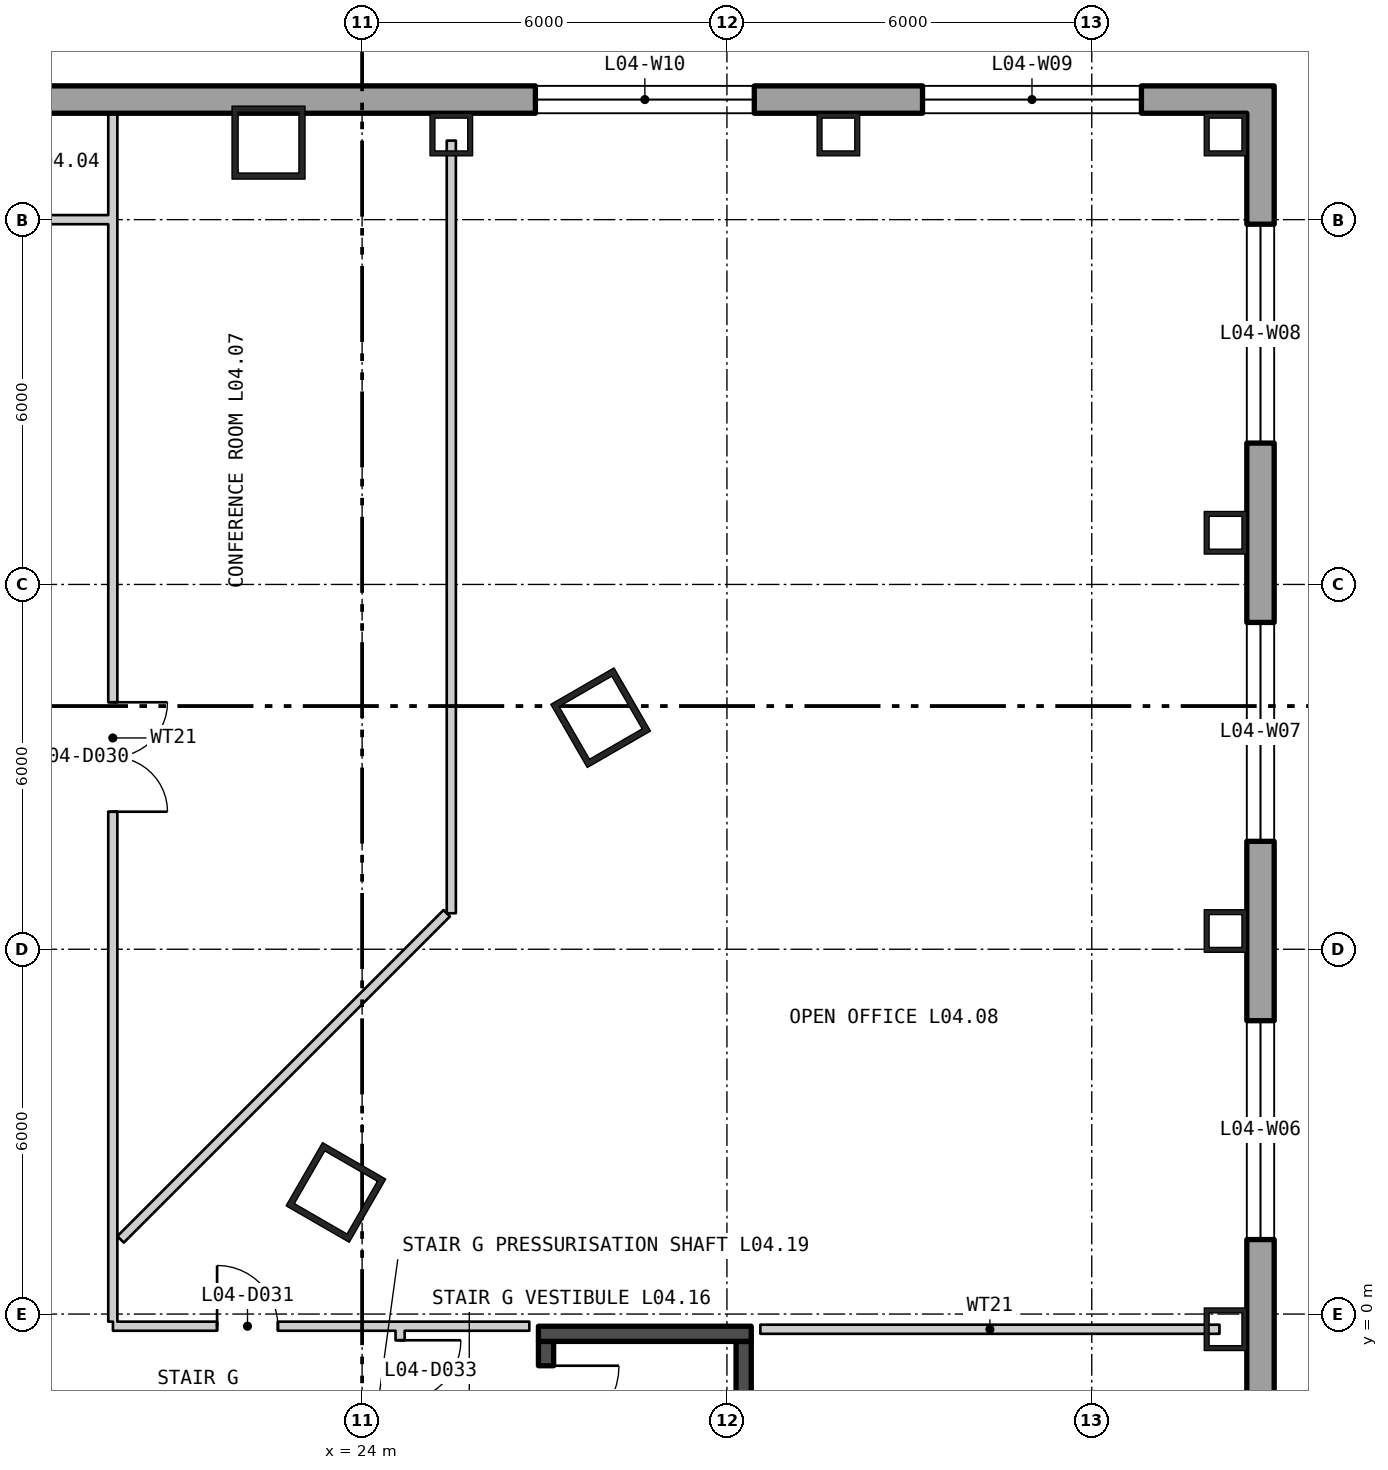
"""IFC4 building model, lengths in metres.
Left out: names, types, materials, properties, quantities, classifications, styles, units other than length and angle.
Written with IfcOpenShell. Run it as: python <this file> out.ifc"""

import sys

from ifc_helpers import new_model, si_unit, direction, frame, frame_2d, origin, origin_2d, place, context, subcontext, project, spatial, polyline, rectangle, hollow_rectangle, outline, extrude, element, fill, save


model = new_model("IFC4")
c1 = context("Model", 3, precision=1e-05, world=origin(), true_north=direction((0.0, 1.0)))
c2 = subcontext(c1, "Body", "Model", "MODEL_VIEW")
j1 = project(units=[si_unit("LENGTHUNIT", "METRE"), si_unit("PLANEANGLEUNIT", "RADIAN")], contexts=[c1])
p1 = place(None, origin())
s1 = spatial("IfcSite", under=j1, at=p1, CompositionType="ELEMENT")
p2 = place(p1, origin())
s2 = spatial("IfcBuilding", under=s1, at=p2, CompositionType="ELEMENT")
p3 = place(p2, frame((0.0, 0.0, 23.7)))
s3 = spatial("IfcBuildingStorey", under=s2, at=p3, CompositionType="ELEMENT", Elevation=23.7)
for number, where, z_axis, x_axis in (
    (1, (22.461, 19.267, 0.0), (0.0, 0.0, 1.0), (-1.0, 0.0, 0.0)),
    (2, (23.569, 2.0, 0.0), (0.0, 0.0, 1.0), (0.5, 0.866, 0.0)),
    (3, (27.923, 9.808, 0.0), (0.0, 0.0, 1.0), (-0.5, 0.866, 0.0)),
):
    element("IfcColumn", number, at=place(p3, frame(where, z_axis=z_axis, x_axis=x_axis)), inside=s3, PredefinedType="COLUMN", context=c2, shape_type="SweptSolid", body=[
        extrude(hollow_rectangle(XDim=1.2, YDim=1.2, WallThickness=0.1, at=origin_2d()), origin(), (0.0, 0.0, 1.0), 5.1),
    ])
for number, where, z_axis, x_axis in (
    (4, (38.2, -0.25, 0.0), (0.0, 0.0, 1.0), (0.0, 1.0, 0.0)),
    (5, (38.2, 6.3, 0.0), (0.0, 0.0, 1.0), (0.0, 1.0, 0.0)),
    (6, (38.2, 12.85, 0.0), (0.0, 0.0, 1.0), (0.0, 1.0, 0.0)),
    (7, (38.2, 19.4, 0.0), (0.0, 0.0, 1.0), (-1.0, 0.0, 0.0)),
    (8, (31.833, 19.4, 0.0), (0.0, 0.0, 1.0), (-1.0, 0.0, 0.0)),
    (9, (25.467, 19.4, 0.0), (0.0, 0.0, 1.0), (-1.0, 0.0, 0.0)),
):
    element("IfcColumn", number, at=place(p3, frame(where, z_axis=z_axis, x_axis=x_axis)), inside=s3, PredefinedType="COLUMN", context=c2, shape_type="SweptSolid", body=[
        extrude(hollow_rectangle(XDim=0.7, YDim=0.7, WallThickness=0.08, at=origin_2d()), origin(), (0.0, 0.0, 1.0), 4.85),
    ])
p4 = place(p3, frame((38.775, -33.575, -0.4), z_axis=(0.0, 0.0, 1.0), x_axis=(0.0, 1.0, 0.0)))
e10 = element("IfcWall", 10, at=p4, inside=s3, PredefinedType="SOLIDWALL", context=c2, shape_type="SweptSolid", body=[
    extrude(outline(polyline([(-0.225, -0.225), (53.775, -0.225), (53.325, 0.225), (0.225, 0.225), (-0.225, -0.225)])), origin(), (0.0, 0.0, 1.0), 5.1),
])
p5 = place(p4, frame((2.05, 0.0, 1.3)))
e11 = element("IfcOpeningElement", 11, at=p5, cuts=e10, PredefinedType="OPENING", context=c2, shape_type="SweptSolid", body=[
    extrude(rectangle(XDim=3.6, YDim=3.2, at=frame_2d((1.8, 1.6))), frame((0.0, 0.235, 0.0), z_axis=(0.0, -1.0, 0.0), x_axis=(1.0, 0.0, 0.0)), (0.0, 0.0, 1.0), 0.47),
])
p6 = place(p4, frame((8.6, 0.0, 1.3)))
e12 = element("IfcOpeningElement", 12, at=p6, cuts=e10, PredefinedType="OPENING", context=c2, shape_type="SweptSolid", body=[
    extrude(rectangle(XDim=3.6, YDim=3.2, at=frame_2d((1.8, 1.6))), frame((0.0, 0.235, 0.0), z_axis=(0.0, -1.0, 0.0), x_axis=(1.0, 0.0, 0.0)), (0.0, 0.0, 1.0), 0.47),
])
p7 = place(p4, frame((15.15, 0.0, 1.3)))
e13 = element("IfcOpeningElement", 13, at=p7, cuts=e10, PredefinedType="OPENING", context=c2, shape_type="SweptSolid", body=[
    extrude(rectangle(XDim=3.6, YDim=3.2, at=frame_2d((1.8, 1.6))), frame((0.0, 0.235, 0.0), z_axis=(0.0, -1.0, 0.0), x_axis=(1.0, 0.0, 0.0)), (0.0, 0.0, 1.0), 0.47),
])
p8 = place(p4, frame((21.7, 0.0, 1.3)))
e14 = element("IfcOpeningElement", 14, at=p8, cuts=e10, PredefinedType="OPENING", context=c2, shape_type="SweptSolid", body=[
    extrude(rectangle(XDim=3.6, YDim=3.2, at=frame_2d((1.8, 1.6))), frame((0.0, 0.235, 0.0), z_axis=(0.0, -1.0, 0.0), x_axis=(1.0, 0.0, 0.0)), (0.0, 0.0, 1.0), 0.47),
])
p9 = place(p4, frame((28.25, 0.0, 1.3)))
e15 = element("IfcOpeningElement", 15, at=p9, cuts=e10, PredefinedType="OPENING", context=c2, shape_type="SweptSolid", body=[
    extrude(rectangle(XDim=3.6, YDim=3.2, at=frame_2d((1.8, 1.6))), frame((0.0, 0.235, 0.0), z_axis=(0.0, -1.0, 0.0), x_axis=(1.0, 0.0, 0.0)), (0.0, 0.0, 1.0), 0.47),
])
p10 = place(p4, frame((34.8, 0.0, 1.3)))
e16 = element("IfcOpeningElement", 16, at=p10, cuts=e10, PredefinedType="OPENING", context=c2, shape_type="SweptSolid", body=[
    extrude(rectangle(XDim=3.6, YDim=3.2, at=frame_2d((1.8, 1.6))), frame((0.0, 0.235, 0.0), z_axis=(0.0, -1.0, 0.0), x_axis=(1.0, 0.0, 0.0)), (0.0, 0.0, 1.0), 0.47),
])
p11 = place(p4, frame((41.35, 0.0, 1.3)))
e17 = element("IfcOpeningElement", 17, at=p11, cuts=e10, PredefinedType="OPENING", context=c2, shape_type="SweptSolid", body=[
    extrude(rectangle(XDim=3.6, YDim=3.2, at=frame_2d((1.8, 1.6))), frame((0.0, 0.235, 0.0), z_axis=(0.0, -1.0, 0.0), x_axis=(1.0, 0.0, 0.0)), (0.0, 0.0, 1.0), 0.47),
])
p12 = place(p4, frame((47.9, 0.0, 1.3)))
e18 = element("IfcOpeningElement", 18, at=p12, cuts=e10, PredefinedType="OPENING", context=c2, shape_type="SweptSolid", body=[
    extrude(rectangle(XDim=3.6, YDim=3.2, at=frame_2d((1.8, 1.6))), frame((0.0, 0.235, 0.0), z_axis=(0.0, -1.0, 0.0), x_axis=(1.0, 0.0, 0.0)), (0.0, 0.0, 1.0), 0.47),
])
p13 = place(p3, frame((38.775, 19.975, -0.4), z_axis=(0.0, 0.0, 1.0), x_axis=(-1.0, 0.0, 0.0)))
e19 = element("IfcWall", 19, at=p13, inside=s3, PredefinedType="SOLIDWALL", context=c2, shape_type="SweptSolid", body=[
    extrude(outline(polyline([(-0.225, -0.225), (77.775, -0.225), (77.325, 0.225), (0.225, 0.225), (-0.225, -0.225)])), origin(), (0.0, 0.0, 1.0), 5.1),
])
p14 = place(p13, frame((1.958, 0.0, 1.3)))
e20 = element("IfcOpeningElement", 20, at=p14, cuts=e19, PredefinedType="OPENING", context=c2, shape_type="SweptSolid", body=[
    extrude(rectangle(XDim=3.6, YDim=3.2, at=frame_2d((1.8, 1.6))), frame((0.0, 0.235, 0.0), z_axis=(0.0, -1.0, 0.0), x_axis=(1.0, 0.0, 0.0)), (0.0, 0.0, 1.0), 0.47),
])
p15 = place(p13, frame((8.325, 0.0, 1.3)))
e21 = element("IfcOpeningElement", 21, at=p15, cuts=e19, PredefinedType="OPENING", context=c2, shape_type="SweptSolid", body=[
    extrude(rectangle(XDim=3.6, YDim=3.2, at=frame_2d((1.8, 1.6))), frame((0.0, 0.235, 0.0), z_axis=(0.0, -1.0, 0.0), x_axis=(1.0, 0.0, 0.0)), (0.0, 0.0, 1.0), 0.47),
])
p16 = place(p13, frame((20.952, 0.0, 1.3)))
e22 = element("IfcOpeningElement", 22, at=p16, cuts=e19, PredefinedType="OPENING", context=c2, shape_type="SweptSolid", body=[
    extrude(rectangle(XDim=3.6, YDim=3.2, at=frame_2d((1.8, 1.6))), frame((0.0, 0.235, 0.0), z_axis=(0.0, -1.0, 0.0), x_axis=(1.0, 0.0, 0.0)), (0.0, 0.0, 1.0), 0.47),
])
p17 = place(p13, frame((27.425, 0.0, 1.3)))
e23 = element("IfcOpeningElement", 23, at=p17, cuts=e19, PredefinedType="OPENING", context=c2, shape_type="SweptSolid", body=[
    extrude(rectangle(XDim=3.6, YDim=3.2, at=frame_2d((1.8, 1.6))), frame((0.0, 0.235, 0.0), z_axis=(0.0, -1.0, 0.0), x_axis=(1.0, 0.0, 0.0)), (0.0, 0.0, 1.0), 0.47),
])
p18 = place(p13, frame((46.525, 0.0, 1.3)))
e24 = element("IfcOpeningElement", 24, at=p18, cuts=e19, PredefinedType="OPENING", context=c2, shape_type="SweptSolid", body=[
    extrude(rectangle(XDim=3.6, YDim=3.2, at=frame_2d((1.8, 1.6))), frame((0.0, 0.235, 0.0), z_axis=(0.0, -1.0, 0.0), x_axis=(1.0, 0.0, 0.0)), (0.0, 0.0, 1.0), 0.47),
])
p19 = place(p13, frame((52.998, 0.0, 1.3)))
e25 = element("IfcOpeningElement", 25, at=p19, cuts=e19, PredefinedType="OPENING", context=c2, shape_type="SweptSolid", body=[
    extrude(rectangle(XDim=3.6, YDim=3.2, at=frame_2d((1.8, 1.6))), frame((0.0, 0.235, 0.0), z_axis=(0.0, -1.0, 0.0), x_axis=(1.0, 0.0, 0.0)), (0.0, 0.0, 1.0), 0.47),
])
p20 = place(p13, frame((65.625, 0.0, 1.3)))
e26 = element("IfcOpeningElement", 26, at=p20, cuts=e19, PredefinedType="OPENING", context=c2, shape_type="SweptSolid", body=[
    extrude(rectangle(XDim=3.6, YDim=3.2, at=frame_2d((1.8, 1.6))), frame((0.0, 0.235, 0.0), z_axis=(0.0, -1.0, 0.0), x_axis=(1.0, 0.0, 0.0)), (0.0, 0.0, 1.0), 0.47),
])
p21 = place(p13, frame((71.992, 0.0, 1.3)))
e27 = element("IfcOpeningElement", 27, at=p21, cuts=e19, PredefinedType="OPENING", context=c2, shape_type="SweptSolid", body=[
    extrude(rectangle(XDim=3.6, YDim=3.2, at=frame_2d((1.8, 1.6))), frame((0.0, 0.235, 0.0), z_axis=(0.0, -1.0, 0.0), x_axis=(1.0, 0.0, 0.0)), (0.0, 0.0, 1.0), 0.47),
])
p22 = place(p3, frame((27.025, -7.75, 0.0), z_axis=(0.0, 0.0, 1.0), x_axis=(0.0, 1.0, 0.0)))
e28 = element("IfcWall", 28, at=p22, inside=s3, PredefinedType="SHEAR", context=c2, shape_type="SweptSolid", body=[
    extrude(rectangle(XDim=7.3, YDim=0.25, at=frame_2d((3.65, 0.0))), origin(), (0.0, 0.0, 1.0), 4.85),
])
p23 = place(p22, frame((5.7, 0.0, 0.0)))
e29 = element("IfcOpeningElement", 29, at=p23, cuts=e28, PredefinedType="OPENING", context=c2, shape_type="SweptSolid", body=[
    extrude(rectangle(XDim=1.2, YDim=2.1, at=frame_2d((0.6, 1.05))), frame((0.0, 0.135, 0.0), z_axis=(0.0, -1.0, 0.0), x_axis=(1.0, 0.0, 0.0)), (0.0, 0.0, 1.0), 0.27),
])
p24 = place(p3, frame((30.275, -7.75, 0.0), z_axis=(0.0, 0.0, 1.0), x_axis=(0.0, 1.0, 0.0)))
e30 = element("IfcWall", 30, at=p24, inside=s3, PredefinedType="SHEAR", context=c2, shape_type="SweptSolid", body=[
    extrude(rectangle(XDim=7.3, YDim=0.25, at=frame_2d((3.65, 0.0))), origin(), (0.0, 0.0, 1.0), 4.85),
])
p25 = place(p3, frame((26.9, -0.325, 0.0), z_axis=(0.0, 0.0, 1.0), x_axis=(1.0, 0.0, 0.0)))
e31 = element("IfcWall", 31, at=p25, inside=s3, PredefinedType="SHEAR", context=c2, shape_type="SweptSolid", body=[
    extrude(rectangle(XDim=3.5, YDim=0.25, at=frame_2d((1.75, 0.0))), origin(), (0.0, 0.0, 1.0), 4.85),
])
p26 = place(p3, frame((17.5, 18.0, 0.0), z_axis=(0.0, 0.0, 1.0), x_axis=(1.0, 0.0, 0.0)))
e32 = element("IfcWall", 32, at=p26, inside=s3, PredefinedType="PARTITIONING", context=c2, shape_type="SweptSolid", body=[
    extrude(rectangle(XDim=2.475, YDim=0.15, at=frame_2d((1.238, 0.0))), origin(), (0.0, 0.0, 1.0), 4.3),
])
p27 = place(p3, frame((19.9, -0.125, 0.0), z_axis=(0.0, 0.0, 1.0), x_axis=(0.0, 1.0, 0.0)))
e33 = element("IfcWall", 33, at=p27, inside=s3, PredefinedType="PARTITIONING", context=c2, shape_type="SweptSolid", body=[
    extrude(rectangle(XDim=1.15, YDim=0.15, at=frame_2d((0.575, 0.0))), origin(), (0.0, 0.0, 1.0), 4.85),
])
p28 = place(p3, frame((19.9, 1.025, 0.0), z_axis=(0.0, 0.0, 1.0), x_axis=(0.0, 1.0, 0.0)))
e34 = element("IfcWall", 34, at=p28, inside=s3, PredefinedType="PARTITIONING", context=c2, shape_type="SweptSolid", body=[
    extrude(rectangle(XDim=16.9, YDim=0.15, at=frame_2d((8.45, 0.0))), origin(), (0.0, 0.0, 1.0), 4.85),
])
p29 = place(p28, frame((7.237, 0.0, 0.0)))
e35 = element("IfcOpeningElement", 35, at=p29, cuts=e34, PredefinedType="OPENING", context=c2, shape_type="SweptSolid", body=[
    extrude(rectangle(XDim=1.8, YDim=2.1, at=frame_2d((0.9, 1.05))), frame((0.0, 0.085, 0.0), z_axis=(0.0, -1.0, 0.0), x_axis=(1.0, 0.0, 0.0)), (0.0, 0.0, 1.0), 0.17),
])
p30 = place(p3, frame((19.9, 18.075, 0.0), z_axis=(0.0, 0.0, 1.0), x_axis=(0.0, 1.0, 0.0)))
e36 = element("IfcWall", 36, at=p30, inside=s3, PredefinedType="PARTITIONING", context=c2, shape_type="SweptSolid", body=[
    extrude(rectangle(XDim=1.675, YDim=0.15, at=frame_2d((0.838, 0.0))), origin(), (0.0, 0.0, 1.0), 4.85),
])
p31 = place(p3, frame((19.902, -0.2, 0.0), z_axis=(0.0, 0.0, 1.0), x_axis=(1.0, 0.0, 0.0)))
e37 = element("IfcWall", 37, at=p31, inside=s3, PredefinedType="PARTITIONING", context=c2, shape_type="SweptSolid", body=[
    extrude(rectangle(XDim=6.848, YDim=0.15, at=frame_2d((3.424, 0.0))), origin(), (0.0, 0.0, 1.0), 4.85),
])
p32 = place(p31, frame((1.713, 0.0, 0.0)))
e38 = element("IfcOpeningElement", 38, at=p32, cuts=e37, PredefinedType="OPENING", context=c2, shape_type="SweptSolid", body=[
    extrude(rectangle(XDim=1.0, YDim=2.1, at=frame_2d((0.5, 1.05))), frame((0.0, 0.085, 0.0), z_axis=(0.0, -1.0, 0.0), x_axis=(1.0, 0.0, 0.0)), (0.0, 0.0, 1.0), 0.17),
])
p33 = place(p3, frame((20.028, 1.228, 0.0), z_axis=(0.0, 0.0, 1.0), x_axis=(0.707106781187, 0.707106781187, 0.0)))
e39 = element("IfcWall", 39, at=p33, inside=s3, PredefinedType="PARTITIONING", context=c2, shape_type="SweptSolid", body=[
    extrude(rectangle(XDim=7.586, YDim=0.15, at=frame_2d((3.793, 0.0))), origin(), (0.0, 0.0, 1.0), 4.85),
])
p34 = place(p3, frame((24.625, -1.588, 0.0), z_axis=(0.0, 0.0, 1.0), x_axis=(0.0, 1.0, 0.0)))
e40 = element("IfcWall", 40, at=p34, inside=s3, PredefinedType="PARTITIONING", context=c2, shape_type="SweptSolid", body=[
    extrude(rectangle(XDim=1.313, YDim=0.15, at=frame_2d((0.656, 0.0))), origin(), (0.0, 0.0, 1.0), 4.85),
])
p35 = place(p34, frame((0.157, 0.0, 0.0)))
e41 = element("IfcOpeningElement", 41, at=p35, cuts=e40, PredefinedType="OPENING", context=c2, shape_type="SweptSolid", body=[
    extrude(rectangle(XDim=1.0, YDim=2.1, at=frame_2d((0.5, 1.05))), frame((0.0, 0.085, 0.0), z_axis=(0.0, -1.0, 0.0), x_axis=(1.0, 0.0, 0.0)), (0.0, 0.0, 1.0), 0.17),
])
p36 = place(p3, frame((25.467, 6.592, 0.0), z_axis=(0.0, 0.0, 1.0), x_axis=(0.0, 1.0, 0.0)))
e42 = element("IfcWall", 42, at=p36, inside=s3, PredefinedType="PARTITIONING", context=c2, shape_type="SweptSolid", body=[
    extrude(rectangle(XDim=7.936, YDim=0.15, at=frame_2d((3.968, 0.0))), origin(), (0.0, 0.0, 1.0), 4.85),
])
p37 = place(p3, frame((25.467, 14.528, 0.0), z_axis=(0.0, 0.0, 1.0), x_axis=(0.0, 1.0, 0.0)))
e43 = element("IfcWall", 43, at=p37, inside=s3, PredefinedType="PARTITIONING", context=c2, shape_type="SweptSolid", body=[
    extrude(rectangle(XDim=4.772, YDim=0.15, at=frame_2d((2.386, 0.0))), origin(), (0.0, 0.0, 1.0), 4.25),
])
p38 = place(p3, frame((30.55, -0.25, 0.0), z_axis=(0.0, 0.0, 1.0), x_axis=(1.0, 0.0, 0.0)))
e44 = element("IfcWall", 44, at=p38, inside=s3, PredefinedType="PARTITIONING", context=c2, shape_type="SweptSolid", body=[
    extrude(rectangle(XDim=7.55, YDim=0.15, at=frame_2d((3.775, 0.0))), origin(), (0.0, 0.0, 1.0), 4.85),
])
p39 = place(p10, origin())
e45 = element("IfcWindow", 45, at=p39, inside=s3, PartitioningType="SINGLE_PANEL", PredefinedType="WINDOW", context=c2, shape_type="SweptSolid", body=[
    extrude(rectangle(XDim=3.6, YDim=3.2, at=frame_2d((1.8, 1.6))), frame((0.0, 0.105, 0.0), z_axis=(0.0, -1.0, 0.0), x_axis=(1.0, 0.0, 0.0)), (0.0, 0.0, 1.0), 0.06),
])
fill(e16, e45)
p40 = place(p11, origin())
e46 = element("IfcWindow", 46, at=p40, inside=s3, PartitioningType="SINGLE_PANEL", PredefinedType="WINDOW", context=c2, shape_type="SweptSolid", body=[
    extrude(rectangle(XDim=3.6, YDim=3.2, at=frame_2d((1.8, 1.6))), frame((0.0, 0.105, 0.0), z_axis=(0.0, -1.0, 0.0), x_axis=(1.0, 0.0, 0.0)), (0.0, 0.0, 1.0), 0.06),
])
fill(e17, e46)
p41 = place(p12, origin())
e47 = element("IfcWindow", 47, at=p41, inside=s3, PartitioningType="SINGLE_PANEL", PredefinedType="WINDOW", context=c2, shape_type="SweptSolid", body=[
    extrude(rectangle(XDim=3.6, YDim=3.2, at=frame_2d((1.8, 1.6))), frame((0.0, 0.105, 0.0), z_axis=(0.0, -1.0, 0.0), x_axis=(1.0, 0.0, 0.0)), (0.0, 0.0, 1.0), 0.06),
])
fill(e18, e47)
p42 = place(p14, origin())
e48 = element("IfcWindow", 48, at=p42, inside=s3, PartitioningType="SINGLE_PANEL", PredefinedType="WINDOW", context=c2, shape_type="SweptSolid", body=[
    extrude(rectangle(XDim=3.6, YDim=3.2, at=frame_2d((1.8, 1.6))), frame((0.0, 0.105, 0.0), z_axis=(0.0, -1.0, 0.0), x_axis=(1.0, 0.0, 0.0)), (0.0, 0.0, 1.0), 0.06),
])
fill(e20, e48)
p43 = place(p15, origin())
e49 = element("IfcWindow", 49, at=p43, inside=s3, PartitioningType="SINGLE_PANEL", PredefinedType="WINDOW", context=c2, shape_type="SweptSolid", body=[
    extrude(rectangle(XDim=3.6, YDim=3.2, at=frame_2d((1.8, 1.6))), frame((0.0, 0.105, 0.0), z_axis=(0.0, -1.0, 0.0), x_axis=(1.0, 0.0, 0.0)), (0.0, 0.0, 1.0), 0.06),
])
fill(e21, e49)
p44 = place(p23, origin())
e50 = element("IfcDoor", 50, at=p44, inside=s3, OperationType="SINGLE_SWING_RIGHT", PredefinedType="DOOR", context=c2, shape_type="SweptSolid", body=[
    extrude(rectangle(XDim=1.2, YDim=2.1, at=frame_2d((0.6, 1.05))), frame((0.0, 0.025, 0.0), z_axis=(0.0, -1.0, 0.0), x_axis=(1.0, 0.0, 0.0)), (0.0, 0.0, 1.0), 0.05),
])
fill(e29, e50)
p45 = place(p29, origin())
e51 = element("IfcDoor", 51, at=p45, inside=s3, OperationType="DOUBLE_DOOR_SINGLE_SWING", PredefinedType="DOOR", context=c2, shape_type="SweptSolid", body=[
    extrude(rectangle(XDim=1.8, YDim=2.1, at=frame_2d((0.9, 1.05))), frame((0.0, 0.025, 0.0), z_axis=(0.0, -1.0, 0.0), x_axis=(1.0, 0.0, 0.0)), (0.0, 0.0, 1.0), 0.05),
])
fill(e35, e51)
p46 = place(p32, origin())
e52 = element("IfcDoor", 52, at=p46, inside=s3, OperationType="SINGLE_SWING_RIGHT", PredefinedType="DOOR", context=c2, shape_type="SweptSolid", body=[
    extrude(rectangle(XDim=1.0, YDim=2.1, at=frame_2d((0.5, 1.05))), frame((0.0, 0.025, 0.0), z_axis=(0.0, -1.0, 0.0), x_axis=(1.0, 0.0, 0.0)), (0.0, 0.0, 1.0), 0.05),
])
fill(e38, e52)
p47 = place(p35, origin())
e53 = element("IfcDoor", 53, at=p47, inside=s3, OperationType="SINGLE_SWING_RIGHT", PredefinedType="DOOR", context=c2, shape_type="SweptSolid", body=[
    extrude(rectangle(XDim=1.0, YDim=2.1, at=frame_2d((0.5, 1.05))), frame((0.0, 0.025, 0.0), z_axis=(0.0, -1.0, 0.0), x_axis=(1.0, 0.0, 0.0)), (0.0, 0.0, 1.0), 0.05),
])
fill(e41, e53)
save(model, sys.argv[1])
